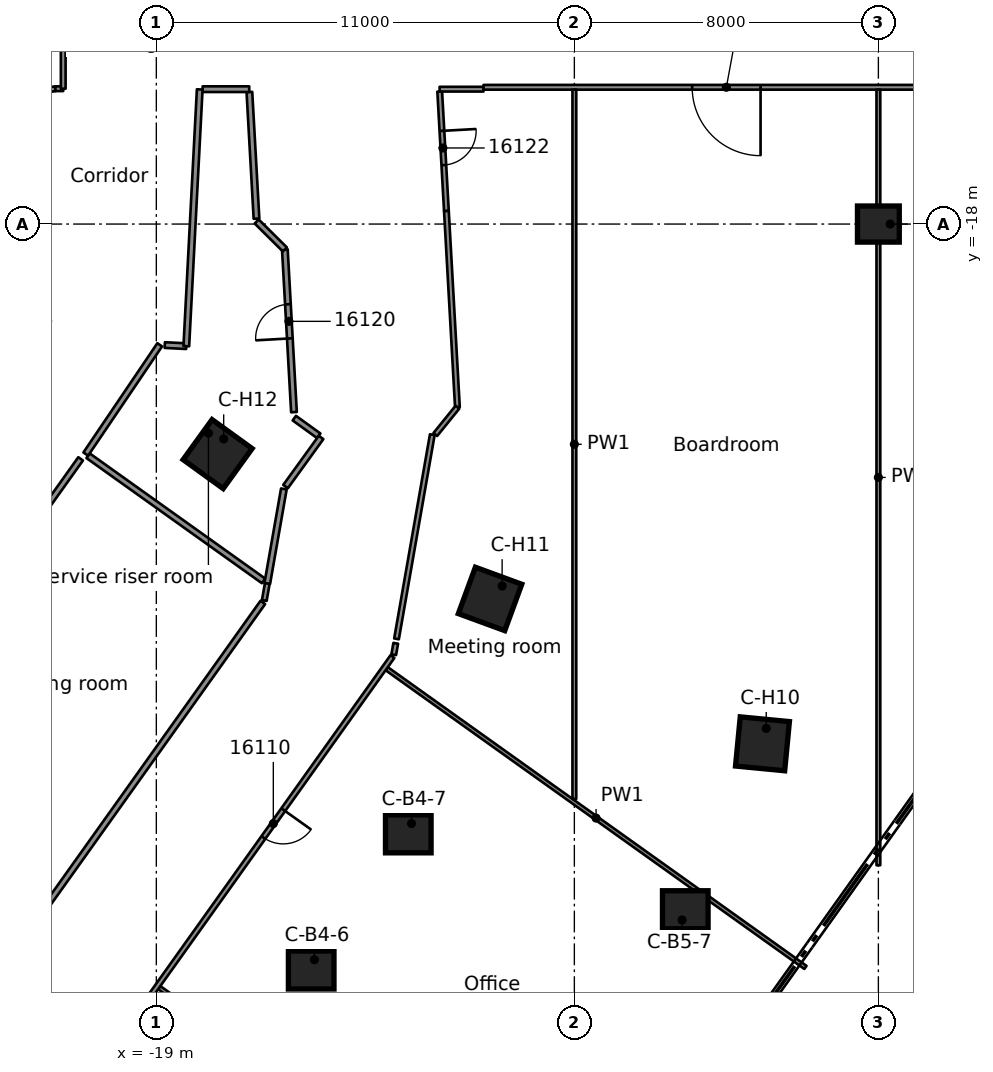
"""IFC4 building model, lengths in metres.
Left out: names, types, materials, properties, quantities, classifications, styles, units other than length and angle.
Written with IfcOpenShell. Run it as: python <this file> out.ifc"""

import sys

from ifc_helpers import new_model, si_unit, direction, frame, frame_2d, origin, origin_2d, place, context, subcontext, project, spatial, rectangle, extrude, element, fill, save


model = new_model("IFC4")
c1 = context("Model", 3, precision=1e-05, world=origin(), true_north=direction((0.0, 1.0)))
c2 = subcontext(c1, "Body", "Model", "MODEL_VIEW")
j1 = project(units=[si_unit("LENGTHUNIT", "METRE"), si_unit("PLANEANGLEUNIT", "RADIAN")], contexts=[c1])
p1 = place(None, origin())
s1 = spatial("IfcSite", under=j1, at=p1, CompositionType="ELEMENT")
p2 = place(p1, origin())
s2 = spatial("IfcBuilding", under=s1, at=p2, CompositionType="ELEMENT")
p3 = place(p2, frame((0.0, 0.0, 80.7)))
s3 = spatial("IfcBuildingStorey", under=s2, at=p3, CompositionType="ELEMENT", Elevation=80.7)
for number, where, z_axis, x_axis in (
    (1, (-14.925, -37.628, 0.0), (0.0, 0.0, 1.0), (1.0, 0.0, 0.0)),
    (2, (-12.37, -34.045, 0.0), (0.0, 0.0, 1.0), (1.0, 0.0, 0.0)),
    (3, (-5.081, -36.042, 0.0), (0.0, 0.0, 1.0), (1.0, 0.0, 0.0)),
):
    element("IfcColumn", number, at=place(p3, frame(where, z_axis=z_axis, x_axis=x_axis)), inside=s3, PredefinedType="COLUMN", context=c2, shape_type="SweptSolid", body=[
        extrude(rectangle(XDim=1.2, YDim=1.0, at=origin_2d()), origin(), (0.0, 0.0, 1.0), 3.5),
    ])
for number, where, z_axis, x_axis in (
    (4, (-3.05, -31.676, 0.0), (0.0, 0.0, 1.0), (-0.096, -0.995, 0.0)),
    (5, (-10.218, -27.864, 0.0), (0.0, 0.0, 1.0), (-0.344, -0.939, 0.0)),
    (6, (-17.387, -24.053, 0.0), (0.0, 0.0, 1.0), (-0.586, -0.81, 0.0)),
):
    element("IfcColumn", number, at=place(p3, frame(where, z_axis=z_axis, x_axis=x_axis)), inside=s3, PredefinedType="COLUMN", context=c2, shape_type="SweptSolid", body=[
        extrude(rectangle(XDim=1.3, YDim=1.3, at=origin_2d()), origin(), (0.0, 0.0, 1.0), 3.5),
    ])
p4 = place(p3, frame((0.0, -18.0, 0.0), z_axis=(0.0, 0.0, 1.0), x_axis=(1.0, 0.0, 0.0)))
e7 = element("IfcColumn", 7, at=p4, inside=s3, PredefinedType="COLUMN", context=c2, shape_type="SweptSolid", body=[
    extrude(rectangle(XDim=1.1, YDim=0.95, at=origin_2d()), origin(), (0.0, 0.0, 1.0), 3.5),
])
p5 = place(p3, frame((-16.551, -14.526, 0.0), z_axis=(0.0, 0.0, 1.0), x_axis=(0.056037248535, -0.998428678863, 0.0)))
e8 = element("IfcWall", 8, at=p5, inside=s3, PredefinedType="PARTITIONING", context=c2, shape_type="SweptSolid", body=[
    extrude(rectangle(XDim=3.337, YDim=0.15, at=frame_2d((1.668, 0.0))), origin(), (0.0, 0.0, 1.0), 3.08),
])
p6 = place(p3, frame((-15.378, -22.949, 0.0), z_axis=(0.0, 0.0, 1.0), x_axis=(-0.055958704695, 0.998433084072, 0.0)))
e9 = element("IfcWall", 9, at=p6, inside=s3, PredefinedType="PARTITIONING", context=c2, shape_type="SweptSolid", body=[
    extrude(rectangle(XDim=4.289, YDim=0.15, at=frame_2d((2.145, 0.0))), origin(), (0.0, 0.0, 1.0), 3.08),
])
p7 = place(p6, frame((1.943, 0.0, 0.0)))
e10 = element("IfcOpeningElement", 10, at=p7, cuts=e9, PredefinedType="OPENING", context=c2, shape_type="SweptSolid", body=[
    extrude(rectangle(XDim=0.9, YDim=2.1, at=frame_2d((0.45, 1.05))), frame((0.0, 0.085, 0.0), z_axis=(0.0, -1.0, 0.0), x_axis=(1.0, 0.0, 0.0)), (0.0, 0.0, 1.0), 0.17),
])
p8 = place(p3, frame((-11.367, -17.653, 0.0), z_axis=(0.0, 0.0, 1.0), x_axis=(0.05605539039, -0.998427660478, 0.0)))
e11 = element("IfcWall", 11, at=p8, inside=s3, PredefinedType="PARTITIONING", context=c2, shape_type="SweptSolid", body=[
    extrude(rectangle(XDim=5.174, YDim=0.125, at=frame_2d((2.587, 0.0))), origin(), (0.0, 0.0, 1.0), 3.08),
])
p9 = place(p3, frame((-11.543, -14.513, 0.0), z_axis=(0.0, 0.0, 1.0), x_axis=(0.055968733348, -0.99843252195, 0.0)))
e12 = element("IfcWall", 12, at=p9, inside=s3, PredefinedType="PARTITIONING", context=c2, shape_type="SweptSolid", body=[
    extrude(rectangle(XDim=3.145, YDim=0.125, at=frame_2d((1.573, 0.0))), origin(), (0.0, 0.0, 1.0), 3.08),
])
p10 = place(p9, frame((1.038, 0.0, 0.0)))
e13 = element("IfcOpeningElement", 13, at=p10, cuts=e12, PredefinedType="OPENING", context=c2, shape_type="SweptSolid", body=[
    extrude(rectangle(XDim=0.9, YDim=2.1, at=frame_2d((0.45, 1.05))), frame((0.0, 0.073, 0.0), z_axis=(0.0, -1.0, 0.0), x_axis=(1.0, 0.0, 0.0)), (0.0, 0.0, 1.0), 0.145),
])
p11 = place(p3, frame((-15.369, -23.107, 0.0), z_axis=(0.0, 0.0, 1.0), x_axis=(0.810768536176, -0.585366877049, 0.0)))
e14 = element("IfcWall", 14, at=p11, inside=s3, PredefinedType="PARTITIONING", context=c2, shape_type="SweptSolid", body=[
    extrude(rectangle(XDim=0.793, YDim=0.15, at=frame_2d((0.396, 0.0))), origin(), (0.0, 0.0, 1.0), 3.08),
])
p12 = place(p3, frame((-18.924, -38.091, 0.0), z_axis=(0.0, 0.0, 1.0), x_axis=(0.814103772743, -0.580719422101, 0.0)))
e15 = element("IfcWall", 15, at=p12, inside=s3, PredefinedType="PARTITIONING", context=c2, shape_type="SweptSolid", body=[
    extrude(rectangle(XDim=13.536, YDim=0.1, at=frame_2d((6.768, 0.0))), origin(), (0.0, 0.0, 1.0), 3.08),
])
p13 = place(p3, frame((-20.796, -24.096, 0.0), z_axis=(0.0, 0.0, 1.0), x_axis=(0.814114264503, -0.580704713544, 0.0)))
e16 = element("IfcWall", 16, at=p13, inside=s3, PredefinedType="PARTITIONING", context=c2, shape_type="SweptSolid", body=[
    extrude(rectangle(XDim=5.672, YDim=0.15, at=frame_2d((2.836, 0.0))), origin(), (0.0, 0.0, 1.0), 3.08),
])
p14 = place(p3, frame((-12.939, -29.699, 0.0), z_axis=(0.0, 0.0, 1.0), x_axis=(0.814095245994, -0.580731375465, 0.0)))
e17 = element("IfcWall", 17, at=p14, inside=s3, PredefinedType="PARTITIONING", context=c2, shape_type="SweptSolid", body=[
    extrude(rectangle(XDim=13.537, YDim=0.1, at=frame_2d((6.768, 0.0))), origin(), (0.0, 0.0, 1.0), 3.08),
])
p15 = place(p3, frame((-18.778, -21.184, 0.0), z_axis=(0.0, 0.0, 1.0), x_axis=(0.99870791772, -0.050818255408, 0.0)))
e18 = element("IfcWall", 18, at=p15, inside=s3, PredefinedType="PARTITIONING", context=c2, shape_type="SweptSolid", body=[
    extrude(rectangle(XDim=0.567, YDim=0.15, at=frame_2d((0.283, 0.0))), origin(), (0.0, 0.0, 1.0), 3.08),
])
p16 = place(p3, frame((-21.662, -14.439, 0.0), z_axis=(0.0, 0.0, 1.0), x_axis=(1.0, 0.0, 0.0)))
e19 = element("IfcWall", 19, at=p16, inside=s3, PredefinedType="PARTITIONING", context=c2, shape_type="SweptSolid", body=[
    extrude(rectangle(XDim=0.212, YDim=0.125, at=frame_2d((0.106, 0.0))), origin(), (0.0, 0.0, 1.0), 3.08),
])
p17 = place(p3, frame((-17.781, -14.451, 0.0), z_axis=(0.0, 0.0, 1.0), x_axis=(1.0, 0.0, 0.0)))
e20 = element("IfcWall", 20, at=p17, inside=s3, PredefinedType="PARTITIONING", context=c2, shape_type="SweptSolid", body=[
    extrude(rectangle(XDim=1.226, YDim=0.15, at=frame_2d((0.613, 0.0))), origin(), (0.0, 0.0, 1.0), 3.08),
])
p18 = place(p3, frame((-11.546, -14.451, 0.0), z_axis=(0.0, 0.0, 1.0), x_axis=(1.0, 0.0, 0.0)))
e21 = element("IfcWall", 21, at=p18, inside=s3, PredefinedType="PARTITIONING", context=c2, shape_type="SweptSolid", body=[
    extrude(rectangle(XDim=1.155, YDim=0.125, at=frame_2d((0.577, 0.0))), origin(), (0.0, 0.0, 1.0), 3.08),
])
p19 = place(p3, frame((10.391, -14.401, 0.0), z_axis=(0.0, 0.0, 1.0), x_axis=(-1.0, 0.0, 0.0)))
e22 = element("IfcWall", 22, at=p19, inside=s3, PredefinedType="PARTITIONING", context=c2, shape_type="SweptSolid", body=[
    extrude(rectangle(XDim=20.781, YDim=0.125, at=frame_2d((10.391, 0.0))), origin(), (0.0, 0.0, 1.0), 3.08),
])
p20 = place(p19, frame((13.491, 0.0, 0.0)))
e23 = element("IfcOpeningElement", 23, at=p20, cuts=e22, PredefinedType="OPENING", context=c2, shape_type="SweptSolid", body=[
    extrude(rectangle(XDim=1.8, YDim=2.1, at=frame_2d((0.9, 1.05))), frame((0.0, 0.073, 0.0), z_axis=(0.0, -1.0, 0.0), x_axis=(1.0, 0.0, 0.0)), (0.0, 0.0, 1.0), 0.145),
])
p21 = place(p19, frame((5.991, 0.0, 0.0)))
e24 = element("IfcOpeningElement", 24, at=p21, cuts=e22, PredefinedType="OPENING", context=c2, shape_type="SweptSolid", body=[
    extrude(rectangle(XDim=0.9, YDim=2.1, at=frame_2d((0.45, 1.05))), frame((0.0, 0.073, 0.0), z_axis=(0.0, -1.0, 0.0), x_axis=(1.0, 0.0, 0.0)), (0.0, 0.0, 1.0), 0.145),
])
p22 = place(p3, frame((-11.659, -23.538, 0.0), z_axis=(0.0, 0.0, 1.0), x_axis=(0.629190636354, 0.777251016805, 0.0)))
e25 = element("IfcWall", 25, at=p22, inside=s3, PredefinedType="PARTITIONING", context=c2, shape_type="SweptSolid", body=[
    extrude(rectangle(XDim=0.925, YDim=0.125, at=frame_2d((0.462, 0.0))), origin(), (0.0, 0.0, 1.0), 3.08),
])
p23 = place(p3, frame((-16.359, -17.933, 0.0), z_axis=(0.0, 0.0, 1.0), x_axis=(0.710493081661, -0.703704185658, 0.0)))
e26 = element("IfcWall", 26, at=p23, inside=s3, PredefinedType="PARTITIONING", context=c2, shape_type="SweptSolid", body=[
    extrude(rectangle(XDim=1.043, YDim=0.15, at=frame_2d((0.521, 0.0))), origin(), (0.0, 0.0, 1.0), 3.08),
])
p24 = place(p3, frame((-22.792, -14.599, 0.0), z_axis=(0.0, 0.0, 1.0), x_axis=(0.990221510194, 0.139503981125, 0.0)))
e27 = element("IfcWall", 27, at=p24, inside=s3, PredefinedType="PARTITIONING", context=c2, shape_type="SweptSolid", body=[
    extrude(rectangle(XDim=1.141, YDim=0.125, at=frame_2d((0.571, 0.0))), origin(), (0.0, 0.0, 1.0), 3.08),
])
p25 = place(p3, frame((-20.857, -24.052, 0.0), z_axis=(0.0, 0.0, 1.0), x_axis=(0.560544895906, 0.828124036406, 0.0)))
e28 = element("IfcWall", 28, at=p25, inside=s3, PredefinedType="PARTITIONING", context=c2, shape_type="SweptSolid", body=[
    extrude(rectangle(XDim=3.472, YDim=0.15, at=frame_2d((1.736, 0.0))), origin(), (0.0, 0.0, 1.0), 3.08),
])
p26 = place(p3, frame((-15.6, -24.908, 0.0), z_axis=(0.0, 0.0, 1.0), x_axis=(0.586004379832, 0.810307883966, 0.0)))
e29 = element("IfcWall", 29, at=p26, inside=s3, PredefinedType="PARTITIONING", context=c2, shape_type="SweptSolid", body=[
    extrude(rectangle(XDim=1.596, YDim=0.15, at=frame_2d((0.798, 0.0))), origin(), (0.0, 0.0, 1.0), 3.08),
])
p27 = place(p3, frame((-12.787, -29.381, 0.0), z_axis=(0.0, 0.0, 1.0), x_axis=(-0.580712931826, -0.81410840237, 0.0)))
e30 = element("IfcWall", 30, at=p27, inside=s3, PredefinedType="PARTITIONING", context=c2, shape_type="SweptSolid", body=[
    extrude(rectangle(XDim=25.155, YDim=0.125, at=frame_2d((12.578, 0.0))), origin(), (0.0, 0.0, 1.0), 3.08),
])
p28 = place(p27, frame((4.948, 0.0, 0.0)))
e31 = element("IfcOpeningElement", 31, at=p28, cuts=e30, PredefinedType="OPENING", context=c2, shape_type="SweptSolid", body=[
    extrude(rectangle(XDim=0.9, YDim=2.1, at=frame_2d((0.45, 1.05))), frame((0.0, 0.073, 0.0), z_axis=(0.0, -1.0, 0.0), x_axis=(1.0, 0.0, 0.0)), (0.0, 0.0, 1.0), 0.145),
])
p29 = place(p27, frame((14.755, 0.0, 0.0)))
e32 = element("IfcOpeningElement", 32, at=p29, cuts=e30, PredefinedType="OPENING", context=c2, shape_type="SweptSolid", body=[
    extrude(rectangle(XDim=0.9, YDim=2.1, at=frame_2d((0.45, 1.05))), frame((0.0, 0.073, 0.0), z_axis=(0.0, -1.0, 0.0), x_axis=(1.0, 0.0, 0.0)), (0.0, 0.0, 1.0), 0.145),
])
p30 = place(p27, frame((21.906, 0.0, 0.0)))
e33 = element("IfcOpeningElement", 33, at=p30, cuts=e30, PredefinedType="OPENING", context=c2, shape_type="SweptSolid", body=[
    extrude(rectangle(XDim=0.9, YDim=2.1, at=frame_2d((0.45, 1.05))), frame((0.0, 0.073, 0.0), z_axis=(0.0, -1.0, 0.0), x_axis=(1.0, 0.0, 0.0)), (0.0, 0.0, 1.0), 0.145),
])
p31 = place(p3, frame((-28.41, -45.081, 0.0), z_axis=(0.0, 0.0, 1.0), x_axis=(0.580610007884, 0.814181809392, 0.0)))
e34 = element("IfcWall", 34, at=p31, inside=s3, PredefinedType="PARTITIONING", context=c2, shape_type="SweptSolid", body=[
    extrude(rectangle(XDim=21.035, YDim=0.15, at=frame_2d((10.517, 0.0))), origin(), (0.0, 0.0, 1.0), 3.08),
])
p32 = place(p3, frame((-20.992, -24.178, 0.0), z_axis=(0.0, 0.0, 1.0), x_axis=(-0.580674845043, -0.814135568768, 0.0)))
e35 = element("IfcWall", 35, at=p32, inside=s3, PredefinedType="PARTITIONING", context=c2, shape_type="SweptSolid", body=[
    extrude(rectangle(XDim=19.026, YDim=0.15, at=frame_2d((9.513, 0.0))), origin(), (0.0, 0.0, 1.0), 3.08),
])
p33 = place(p32, frame((4.6, 0.0, 0.0)))
e36 = element("IfcOpeningElement", 36, at=p33, cuts=e35, PredefinedType="OPENING", context=c2, shape_type="SweptSolid", body=[
    extrude(rectangle(XDim=0.9, YDim=2.1, at=frame_2d((0.45, 1.05))), frame((0.0, 0.085, 0.0), z_axis=(0.0, -1.0, 0.0), x_axis=(1.0, 0.0, 0.0)), (0.0, 0.0, 1.0), 0.17),
])
p34 = place(p32, frame((14.226, 0.0, 0.0)))
e37 = element("IfcOpeningElement", 37, at=p34, cuts=e35, PredefinedType="OPENING", context=c2, shape_type="SweptSolid", body=[
    extrude(rectangle(XDim=0.9, YDim=2.1, at=frame_2d((0.45, 1.05))), frame((0.0, 0.085, 0.0), z_axis=(0.0, -1.0, 0.0), x_axis=(1.0, 0.0, 0.0)), (0.0, 0.0, 1.0), 0.17),
])
p35 = place(p3, frame((-12.753, -29.331, 0.0), z_axis=(0.0, 0.0, 1.0), x_axis=(0.173876753839, 0.984767421513, 0.0)))
e38 = element("IfcWall", 38, at=p35, inside=s3, PredefinedType="PARTITIONING", context=c2, shape_type="SweptSolid", body=[
    extrude(rectangle(XDim=0.305, YDim=0.125, at=frame_2d((0.152, 0.0))), origin(), (0.0, 0.0, 1.0), 3.08),
])
p36 = place(p3, frame((-16.081, -27.459, 0.0), z_axis=(0.0, 0.0, 1.0), x_axis=(0.17293102002, 0.984933938046, 0.0)))
e39 = element("IfcWall", 39, at=p36, inside=s3, PredefinedType="PARTITIONING", context=c2, shape_type="SweptSolid", body=[
    extrude(rectangle(XDim=2.527, YDim=0.15, at=frame_2d((1.264, 0.0))), origin(), (0.0, 0.0, 1.0), 3.08),
])
p37 = place(p3, frame((-12.68, -28.915, 0.0), z_axis=(0.0, 0.0, 1.0), x_axis=(0.172666933714, 0.984980268839, 0.0)))
e40 = element("IfcWall", 40, at=p37, inside=s3, PredefinedType="PARTITIONING", context=c2, shape_type="SweptSolid", body=[
    extrude(rectangle(XDim=5.455, YDim=0.125, at=frame_2d((2.728, 0.0))), origin(), (0.0, 0.0, 1.0), 3.08),
])
p38 = place(p3, frame((-16.159, -27.905, 0.0), z_axis=(0.0, 0.0, 1.0), x_axis=(0.17200102348, 0.985096770841, 0.0)))
e41 = element("IfcWall", 41, at=p38, inside=s3, PredefinedType="PARTITIONING", context=c2, shape_type="SweptSolid", body=[
    extrude(rectangle(XDim=0.453, YDim=0.125, at=frame_2d((0.227, 0.0))), origin(), (0.0, 0.0, 1.0), 3.08),
])
p39 = place(p3, frame((-18.211, -21.213, 0.0), z_axis=(0.0, 0.0, 1.0), x_axis=(0.052183789458, 0.998637497853, 0.0)))
e42 = element("IfcWall", 42, at=p39, inside=s3, PredefinedType="PARTITIONING", context=c2, shape_type="SweptSolid", body=[
    extrude(rectangle(XDim=6.765, YDim=0.15, at=frame_2d((3.383, 0.0))), origin(), (0.0, 0.0, 1.0), 3.08),
])
p40 = place(p3, frame((0.0, -34.871, 0.0), z_axis=(0.0, 0.0, 1.0), x_axis=(0.0, 1.0, 0.0)))
e43 = element("IfcWall", 43, at=p40, inside=s3, PredefinedType="PARTITIONING", context=c2, shape_type="SweptSolid", body=[
    extrude(rectangle(XDim=20.408, YDim=0.1, at=frame_2d((10.204, 0.0))), origin(), (0.0, 0.0, 1.0), 3.08),
])
p41 = place(p3, frame((-8.0, -33.126, 0.0), z_axis=(0.0, 0.0, 1.0), x_axis=(0.0, 1.0, 0.0)))
e44 = element("IfcWall", 44, at=p41, inside=s3, PredefinedType="PARTITIONING", context=c2, shape_type="SweptSolid", body=[
    extrude(rectangle(XDim=18.663, YDim=0.1, at=frame_2d((9.332, 0.0))), origin(), (0.0, 0.0, 1.0), 3.08),
])
p42 = place(p3, frame((-21.45, -14.439, 0.0), z_axis=(0.0, 0.0, 1.0), x_axis=(0.0, 1.0, 0.0)))
e45 = element("IfcWall", 45, at=p42, inside=s3, PredefinedType="PARTITIONING", context=c2, shape_type="SweptSolid", body=[
    extrude(rectangle(XDim=28.89, YDim=0.125, at=frame_2d((14.445, 0.0))), origin(), (0.0, 0.0, 1.0), 3.08),
])
p43 = place(p42, frame((3.35, 0.0, 0.0)))
e46 = element("IfcOpeningElement", 46, at=p43, cuts=e45, PredefinedType="OPENING", context=c2, shape_type="SweptSolid", body=[
    extrude(rectangle(XDim=1.8, YDim=2.1, at=frame_2d((0.9, 1.05))), frame((0.0, 0.073, 0.0), z_axis=(0.0, -1.0, 0.0), x_axis=(1.0, 0.0, 0.0)), (0.0, 0.0, 1.0), 0.145),
])
p44 = place(p42, frame((17.544, 0.0, 0.0)))
e47 = element("IfcOpeningElement", 47, at=p44, cuts=e45, PredefinedType="OPENING", context=c2, shape_type="SweptSolid", body=[
    extrude(rectangle(XDim=1.1, YDim=2.1, at=frame_2d((0.55, 1.05))), frame((0.0, 0.073, 0.0), z_axis=(0.0, -1.0, 0.0), x_axis=(1.0, 0.0, 0.0)), (0.0, 0.0, 1.0), 0.145),
])
p45 = place(p42, frame((11.045, 0.0, 0.0)))
e48 = element("IfcOpeningElement", 48, at=p45, cuts=e45, PredefinedType="OPENING", context=c2, shape_type="SweptSolid", body=[
    extrude(rectangle(XDim=0.9, YDim=2.1, at=frame_2d((0.45, 1.05))), frame((0.0, 0.073, 0.0), z_axis=(0.0, -1.0, 0.0), x_axis=(1.0, 0.0, 0.0)), (0.0, 0.0, 1.0), 0.145),
])
p46 = place(p28, origin())
e49 = element("IfcDoor", 49, at=p46, inside=s3, OperationType="SINGLE_SWING_LEFT", PredefinedType="DOOR", context=c2, shape_type="SweptSolid", body=[
    extrude(rectangle(XDim=0.9, YDim=2.1, at=frame_2d((0.45, 1.05))), frame((0.0, 0.025, 0.0), z_axis=(0.0, -1.0, 0.0), x_axis=(1.0, 0.0, 0.0)), (0.0, 0.0, 1.0), 0.05),
])
fill(e31, e49)
p47 = place(p7, origin())
e50 = element("IfcDoor", 50, at=p47, inside=s3, OperationType="SINGLE_SWING_RIGHT", PredefinedType="DOOR", context=c2, shape_type="SweptSolid", body=[
    extrude(rectangle(XDim=0.9, YDim=2.1, at=frame_2d((0.45, 1.05))), frame((0.0, 0.025, 0.0), z_axis=(0.0, -1.0, 0.0), x_axis=(1.0, 0.0, 0.0)), (0.0, 0.0, 1.0), 0.05),
])
fill(e10, e50)
p48 = place(p10, origin())
e51 = element("IfcDoor", 51, at=p48, inside=s3, OperationType="SINGLE_SWING_LEFT", PredefinedType="DOOR", context=c2, shape_type="SweptSolid", body=[
    extrude(rectangle(XDim=0.9, YDim=2.1, at=frame_2d((0.45, 1.05))), frame((0.0, 0.025, 0.0), z_axis=(0.0, -1.0, 0.0), x_axis=(1.0, 0.0, 0.0)), (0.0, 0.0, 1.0), 0.05),
])
fill(e13, e51)
p49 = place(p20, origin())
e52 = element("IfcDoor", 52, at=p49, inside=s3, OperationType="DOUBLE_DOOR_SINGLE_SWING", PredefinedType="DOOR", context=c2, shape_type="SweptSolid", body=[
    extrude(rectangle(XDim=1.8, YDim=2.1, at=frame_2d((0.9, 1.05))), frame((0.0, 0.025, 0.0), z_axis=(0.0, -1.0, 0.0), x_axis=(1.0, 0.0, 0.0)), (0.0, 0.0, 1.0), 0.05),
])
fill(e23, e52)
save(model, sys.argv[1])
